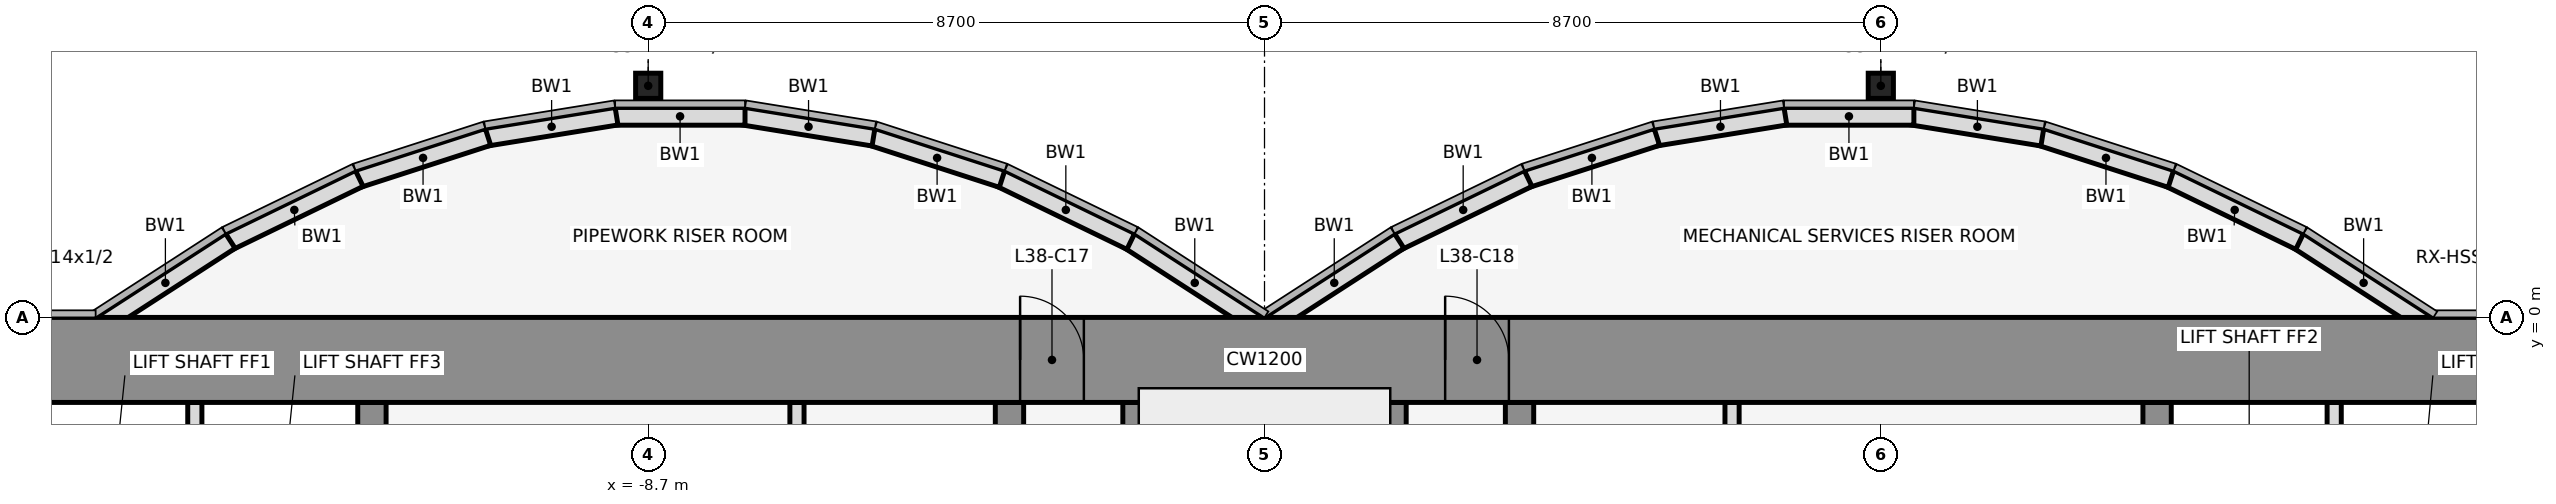
"""IFC4 building model, lengths in metres.
Left out: names, types, materials, properties, quantities, classifications, styles, units other than length and angle.
Written with IfcOpenShell. Run it as: python <this file> out.ifc"""

import sys

from ifc_helpers import new_model, si_unit, direction, frame, frame_2d, origin, origin_2d, place, context, subcontext, project, spatial, rectangle, hollow_rectangle, extrude, element, fill, save


model = new_model("IFC4")
c1 = context("Model", 3, precision=1e-05, world=origin(), true_north=direction((0.0, 1.0)))
c2 = subcontext(c1, "Body", "Model", "MODEL_VIEW")
j1 = project(units=[si_unit("LENGTHUNIT", "METRE"), si_unit("PLANEANGLEUNIT", "RADIAN")], contexts=[c1])
p1 = place(None, origin())
s1 = spatial("IfcSite", under=j1, at=p1, CompositionType="ELEMENT")
p2 = place(p1, origin())
s2 = spatial("IfcBuilding", under=s1, at=p2, CompositionType="ELEMENT")
p3 = place(p2, frame((0.0, 0.0, 173.2)))
s3 = spatial("IfcBuildingStorey", under=s2, at=p3, CompositionType="ELEMENT", Elevation=173.2)
for number, where, z_axis, x_axis in (
    (1, (-8.7, 3.269, 0.0), (0.0, 0.0, 1.0), (1.0, 0.0, 0.0)),
    (2, (8.7, 3.269, 0.0), (0.0, 0.0, 1.0), (1.0, 0.0, 0.0)),
):
    element("IfcColumn", number, at=place(p3, frame(where, z_axis=z_axis, x_axis=x_axis)), inside=s3, PredefinedType="COLUMN", context=c2, shape_type="SweptSolid", body=[
        extrude(hollow_rectangle(XDim=0.356, YDim=0.356, WallThickness=0.012, at=origin_2d()), origin(), (0.0, 0.0, 1.0), 4.1),
    ])
p4 = place(p3, frame((16.432, -0.105, 0.0), z_axis=(0.0, 0.0, 1.0), x_axis=(-0.83981312244, 0.542875602121, 0.0)))
e3 = element("IfcWall", 3, at=p4, inside=s3, PredefinedType="STANDARD", context=c2, shape_type="SweptSolid", body=[
    extrude(rectangle(XDim=2.183, YDim=0.25, at=frame_2d((1.091, 0.0))), origin(), (0.0, 0.0, 1.0), 3.95),
])
p5 = place(p3, frame((14.612, 1.073, 0.0), z_axis=(0.0, 0.0, 1.0), x_axis=(-0.89982408427, 0.436252928206, 0.0)))
e4 = element("IfcWall", 4, at=p5, inside=s3, PredefinedType="STANDARD", context=c2, shape_type="SweptSolid", body=[
    extrude(rectangle(XDim=2.038, YDim=0.25, at=frame_2d((1.019, 0.0))), origin(), (0.0, 0.0, 1.0), 3.95),
])
p6 = place(p3, frame((12.795, 1.955, 0.0), z_axis=(0.0, 0.0, 1.0), x_axis=(-0.951495806175, 0.307661714928, 0.0)))
e5 = element("IfcWall", 5, at=p6, inside=s3, PredefinedType="STANDARD", context=c2, shape_type="SweptSolid", body=[
    extrude(rectangle(XDim=1.927, YDim=0.25, at=frame_2d((0.963, 0.0))), origin(), (0.0, 0.0, 1.0), 3.95),
])
p7 = place(p3, frame((10.98, 2.543, 0.0), z_axis=(0.0, 0.0, 1.0), x_axis=(-0.987181718931, 0.159600293885, 0.0)))
e6 = element("IfcWall", 6, at=p7, inside=s3, PredefinedType="STANDARD", context=c2, shape_type="SweptSolid", body=[
    extrude(rectangle(XDim=1.857, YDim=0.25, at=frame_2d((0.929, 0.0))), origin(), (0.0, 0.0, 1.0), 3.95),
])
p8 = place(p3, frame((9.167, 2.838, 0.0), z_axis=(0.0, 0.0, 1.0), x_axis=(-1.0, 0.0, 0.0)))
e7 = element("IfcWall", 7, at=p8, inside=s3, PredefinedType="STANDARD", context=c2, shape_type="SweptSolid", body=[
    extrude(rectangle(XDim=1.833, YDim=0.25, at=frame_2d((0.917, 0.0))), origin(), (0.0, 0.0, 1.0), 3.95),
])
p9 = place(p3, frame((7.353, 2.84, 0.0), z_axis=(0.0, 0.0, 1.0), x_axis=(-0.987181718931, -0.159600293885, 0.0)))
e8 = element("IfcWall", 8, at=p9, inside=s3, PredefinedType="STANDARD", context=c2, shape_type="SweptSolid", body=[
    extrude(rectangle(XDim=1.857, YDim=0.25, at=frame_2d((0.929, 0.0))), origin(), (0.0, 0.0, 1.0), 3.95),
])
p10 = place(p3, frame((5.538, 2.548, 0.0), z_axis=(0.0, 0.0, 1.0), x_axis=(-0.951495806175, -0.307661714928, 0.0)))
e9 = element("IfcWall", 9, at=p10, inside=s3, PredefinedType="STANDARD", context=c2, shape_type="SweptSolid", body=[
    extrude(rectangle(XDim=1.927, YDim=0.25, at=frame_2d((0.963, 0.0))), origin(), (0.0, 0.0, 1.0), 3.95),
])
p11 = place(p3, frame((3.721, 1.962, 0.0), z_axis=(0.0, 0.0, 1.0), x_axis=(-0.89982408427, -0.436252928206, 0.0)))
e10 = element("IfcWall", 10, at=p11, inside=s3, PredefinedType="STANDARD", context=c2, shape_type="SweptSolid", body=[
    extrude(rectangle(XDim=2.038, YDim=0.25, at=frame_2d((1.019, 0.0))), origin(), (0.0, 0.0, 1.0), 3.95),
])
for number, where, z_axis, x_axis in (
    (11, (1.901, 1.08, 0.0), (0.0, 0.0, 1.0), (-0.84, -0.543, 0.0)),
    (12, (-0.068, -0.105, 0.0), (0.0, 0.0, 1.0), (-0.84, 0.543, 0.0)),
):
    element("IfcWall", number, at=place(p3, frame(where, z_axis=z_axis, x_axis=x_axis)), inside=s3, PredefinedType="STANDARD", context=c2, shape_type="SweptSolid", body=[
        extrude(rectangle(XDim=2.183, YDim=0.25, at=frame_2d((1.091, 0.0))), origin(), (0.0, 0.0, 1.0), 3.95),
    ])
p12 = place(p3, frame((-1.888, 1.073, 0.0), z_axis=(0.0, 0.0, 1.0), x_axis=(-0.89982408427, 0.436252928206, 0.0)))
e13 = element("IfcWall", 13, at=p12, inside=s3, PredefinedType="STANDARD", context=c2, shape_type="SweptSolid", body=[
    extrude(rectangle(XDim=2.038, YDim=0.25, at=frame_2d((1.019, 0.0))), origin(), (0.0, 0.0, 1.0), 3.95),
])
p13 = place(p3, frame((-3.705, 1.955, 0.0), z_axis=(0.0, 0.0, 1.0), x_axis=(-0.951495806175, 0.307661714928, 0.0)))
e14 = element("IfcWall", 14, at=p13, inside=s3, PredefinedType="STANDARD", context=c2, shape_type="SweptSolid", body=[
    extrude(rectangle(XDim=1.927, YDim=0.25, at=frame_2d((0.963, 0.0))), origin(), (0.0, 0.0, 1.0), 3.95),
])
p14 = place(p3, frame((-5.52, 2.543, 0.0), z_axis=(0.0, 0.0, 1.0), x_axis=(-0.987181718931, 0.159600293885, 0.0)))
e15 = element("IfcWall", 15, at=p14, inside=s3, PredefinedType="STANDARD", context=c2, shape_type="SweptSolid", body=[
    extrude(rectangle(XDim=1.857, YDim=0.25, at=frame_2d((0.929, 0.0))), origin(), (0.0, 0.0, 1.0), 3.95),
])
p15 = place(p3, frame((-7.333, 2.838, 0.0), z_axis=(0.0, 0.0, 1.0), x_axis=(-1.0, 0.0, 0.0)))
e16 = element("IfcWall", 16, at=p15, inside=s3, PredefinedType="STANDARD", context=c2, shape_type="SweptSolid", body=[
    extrude(rectangle(XDim=1.833, YDim=0.25, at=frame_2d((0.917, 0.0))), origin(), (0.0, 0.0, 1.0), 3.95),
])
p16 = place(p3, frame((-9.147, 2.84, 0.0), z_axis=(0.0, 0.0, 1.0), x_axis=(-0.987181718931, -0.159600293885, 0.0)))
e17 = element("IfcWall", 17, at=p16, inside=s3, PredefinedType="STANDARD", context=c2, shape_type="SweptSolid", body=[
    extrude(rectangle(XDim=1.857, YDim=0.25, at=frame_2d((0.929, 0.0))), origin(), (0.0, 0.0, 1.0), 3.95),
])
p17 = place(p3, frame((-10.962, 2.548, 0.0), z_axis=(0.0, 0.0, 1.0), x_axis=(-0.951495806175, -0.307661714928, 0.0)))
e18 = element("IfcWall", 18, at=p17, inside=s3, PredefinedType="STANDARD", context=c2, shape_type="SweptSolid", body=[
    extrude(rectangle(XDim=1.927, YDim=0.25, at=frame_2d((0.963, 0.0))), origin(), (0.0, 0.0, 1.0), 3.95),
])
p18 = place(p3, frame((-12.779, 1.962, 0.0), z_axis=(0.0, 0.0, 1.0), x_axis=(-0.89982408427, -0.436252928206, 0.0)))
e19 = element("IfcWall", 19, at=p18, inside=s3, PredefinedType="STANDARD", context=c2, shape_type="SweptSolid", body=[
    extrude(rectangle(XDim=2.038, YDim=0.25, at=frame_2d((1.019, 0.0))), origin(), (0.0, 0.0, 1.0), 3.95),
])
p19 = place(p3, frame((-14.599, 1.08, 0.0), z_axis=(0.0, 0.0, 1.0), x_axis=(-0.83981312244, -0.542875602121, 0.0)))
e20 = element("IfcWall", 20, at=p19, inside=s3, PredefinedType="STANDARD", context=c2, shape_type="SweptSolid", body=[
    extrude(rectangle(XDim=2.183, YDim=0.25, at=frame_2d((1.091, 0.0))), origin(), (0.0, 0.0, 1.0), 3.95),
])
p20 = place(p3, frame((-15.1, -4.6, 0.0), z_axis=(0.0, 0.0, 1.0), x_axis=(0.0, 1.0, 0.0)))
e21 = element("IfcWall", 21, at=p20, inside=s3, PredefinedType="PARTITIONING", context=c2, shape_type="SweptSolid", body=[
    extrude(rectangle(XDim=3.4, YDim=0.2, at=frame_2d((1.7, 0.0))), origin(), (0.0, 0.0, 1.0), 2.84),
])
p21 = place(p3, frame((-12.6, -11.8, 0.0), z_axis=(0.0, 0.0, 1.0), x_axis=(0.0, 1.0, 0.0)))
e22 = element("IfcWall", 22, at=p21, inside=s3, PredefinedType="SHEAR", context=c2, shape_type="SweptSolid", body=[
    extrude(rectangle(XDim=10.6, YDim=0.4, at=frame_2d((5.3, 0.0))), origin(), (0.0, 0.0, 1.0), 4.1),
])
p22 = place(p21, frame((4.75, 0.0, 0.0)))
e23 = element("IfcOpeningElement", 23, at=p22, cuts=e22, PredefinedType="OPENING", context=c2, shape_type="SweptSolid", body=[
    extrude(rectangle(XDim=1.1, YDim=2.1, at=frame_2d((0.55, 1.05))), frame((0.0, 0.212, 0.0), z_axis=(0.0, -1.0, 0.0), x_axis=(1.0, 0.0, 0.0)), (0.0, 0.0, 1.0), 0.424),
])
p23 = place(p3, frame((-6.6, -4.6, 0.0), z_axis=(0.0, 0.0, 1.0), x_axis=(0.0, 1.0, 0.0)))
e24 = element("IfcWall", 24, at=p23, inside=s3, PredefinedType="PARTITIONING", context=c2, shape_type="SweptSolid", body=[
    extrude(rectangle(XDim=3.4, YDim=0.2, at=frame_2d((1.7, 0.0))), origin(), (0.0, 0.0, 1.0), 2.84),
])
p24 = place(p3, frame((-3.6, -11.8, 0.0), z_axis=(0.0, 0.0, 1.0), x_axis=(0.0, 1.0, 0.0)))
e25 = element("IfcWall", 25, at=p24, inside=s3, PredefinedType="SHEAR", context=c2, shape_type="SweptSolid", body=[
    extrude(rectangle(XDim=10.6, YDim=0.4, at=frame_2d((5.3, 0.0))), origin(), (0.0, 0.0, 1.0), 4.1),
])
p25 = place(p24, frame((4.85, 0.0, 0.0)))
e26 = element("IfcOpeningElement", 26, at=p25, cuts=e25, PredefinedType="OPENING", context=c2, shape_type="SweptSolid", body=[
    extrude(rectangle(XDim=0.9, YDim=2.1, at=frame_2d((0.45, 1.05))), frame((0.0, 0.212, 0.0), z_axis=(0.0, -1.0, 0.0), x_axis=(1.0, 0.0, 0.0)), (0.0, 0.0, 1.0), 0.424),
])
for number, where, z_axis, x_axis in (
    (27, (-1.8, -11.8, 0.0), (0.0, 0.0, 1.0), (0.0, 1.0, 0.0)),
    (28, (1.8, -11.8, 0.0), (0.0, 0.0, 1.0), (0.0, 1.0, 0.0)),
):
    element("IfcWall", number, at=place(p3, frame(where, z_axis=z_axis, x_axis=x_axis)), inside=s3, PredefinedType="SHEAR", context=c2, shape_type="SweptSolid", body=[
        extrude(rectangle(XDim=10.6, YDim=0.4, at=frame_2d((5.3, 0.0))), origin(), (0.0, 0.0, 1.0), 4.1),
    ])
p26 = place(p3, frame((3.6, -11.8, 0.0), z_axis=(0.0, 0.0, 1.0), x_axis=(0.0, 1.0, 0.0)))
e29 = element("IfcWall", 29, at=p26, inside=s3, PredefinedType="SHEAR", context=c2, shape_type="SweptSolid", body=[
    extrude(rectangle(XDim=10.6, YDim=0.4, at=frame_2d((5.3, 0.0))), origin(), (0.0, 0.0, 1.0), 4.1),
])
p27 = place(p26, frame((1.35, 0.0, 0.0)))
e30 = element("IfcOpeningElement", 30, at=p27, cuts=e29, PredefinedType="OPENING", context=c2, shape_type="SweptSolid", body=[
    extrude(rectangle(XDim=0.9, YDim=2.1, at=frame_2d((0.45, 1.05))), frame((0.0, 0.212, 0.0), z_axis=(0.0, -1.0, 0.0), x_axis=(1.0, 0.0, 0.0)), (0.0, 0.0, 1.0), 0.424),
])
p28 = place(p3, frame((6.6, -4.6, 0.0), z_axis=(0.0, 0.0, 1.0), x_axis=(0.0, 1.0, 0.0)))
e31 = element("IfcWall", 31, at=p28, inside=s3, PredefinedType="PARTITIONING", context=c2, shape_type="SweptSolid", body=[
    extrude(rectangle(XDim=3.4, YDim=0.2, at=frame_2d((1.7, 0.0))), origin(), (0.0, 0.0, 1.0), 2.84),
])
p29 = place(p3, frame((12.6, -11.8, 0.0), z_axis=(0.0, 0.0, 1.0), x_axis=(0.0, 1.0, 0.0)))
e32 = element("IfcWall", 32, at=p29, inside=s3, PredefinedType="SHEAR", context=c2, shape_type="SweptSolid", body=[
    extrude(rectangle(XDim=10.6, YDim=0.4, at=frame_2d((5.3, 0.0))), origin(), (0.0, 0.0, 1.0), 4.1),
])
p30 = place(p29, frame((1.25, 0.0, 0.0)))
e33 = element("IfcOpeningElement", 33, at=p30, cuts=e32, PredefinedType="OPENING", context=c2, shape_type="SweptSolid", body=[
    extrude(rectangle(XDim=1.2, YDim=2.1, at=frame_2d((0.6, 1.05))), frame((0.0, 0.212, 0.0), z_axis=(0.0, -1.0, 0.0), x_axis=(1.0, 0.0, 0.0)), (0.0, 0.0, 1.0), 0.424),
])
p31 = place(p29, frame((4.75, 0.0, 0.0)))
e34 = element("IfcOpeningElement", 34, at=p31, cuts=e32, PredefinedType="OPENING", context=c2, shape_type="SweptSolid", body=[
    extrude(rectangle(XDim=1.1, YDim=2.1, at=frame_2d((0.55, 1.05))), frame((0.0, 0.212, 0.0), z_axis=(0.0, -1.0, 0.0), x_axis=(1.0, 0.0, 0.0)), (0.0, 0.0, 1.0), 0.424),
])
p32 = place(p3, frame((15.1, -4.6, 0.0), z_axis=(0.0, 0.0, 1.0), x_axis=(0.0, 1.0, 0.0)))
e35 = element("IfcWall", 35, at=p32, inside=s3, PredefinedType="PARTITIONING", context=c2, shape_type="SweptSolid", body=[
    extrude(rectangle(XDim=3.4, YDim=0.2, at=frame_2d((1.7, 0.0))), origin(), (0.0, 0.0, 1.0), 2.84),
])
p33 = place(p3, frame((-22.0, -0.6, 0.0), z_axis=(0.0, 0.0, 1.0), x_axis=(1.0, 0.0, 0.0)))
e36 = element("IfcWall", 36, at=p33, inside=s3, PredefinedType="SHEAR", context=c2, shape_type="SweptSolid", body=[
    extrude(rectangle(XDim=44.0, YDim=1.2, at=frame_2d((22.0, 0.0))), origin(), (0.0, 0.0, 1.0), 4.1),
])
p34 = place(p33, frame((18.55, 0.0, 0.0)))
e37 = element("IfcOpeningElement", 37, at=p34, cuts=e36, PredefinedType="OPENING", context=c2, shape_type="SweptSolid", body=[
    extrude(rectangle(XDim=0.9, YDim=2.1, at=frame_2d((0.45, 1.05))), frame((0.0, 0.612, 0.0), z_axis=(0.0, -1.0, 0.0), x_axis=(1.0, 0.0, 0.0)), (0.0, 0.0, 1.0), 1.224),
])
p35 = place(p33, frame((24.55, 0.0, 0.0)))
e38 = element("IfcOpeningElement", 38, at=p35, cuts=e36, PredefinedType="OPENING", context=c2, shape_type="SweptSolid", body=[
    extrude(rectangle(XDim=0.9, YDim=2.1, at=frame_2d((0.45, 1.05))), frame((0.0, 0.612, 0.0), z_axis=(0.0, -1.0, 0.0), x_axis=(1.0, 0.0, 0.0)), (0.0, 0.0, 1.0), 1.224),
])
p36 = place(p34, origin())
e39 = element("IfcDoor", 39, at=p36, inside=s3, OperationType="SINGLE_SWING_LEFT", PredefinedType="DOOR", context=c2, shape_type="SweptSolid", body=[
    extrude(rectangle(XDim=0.9, YDim=2.1, at=frame_2d((0.45, 1.05))), frame((0.0, 0.025, 0.0), z_axis=(0.0, -1.0, 0.0), x_axis=(1.0, 0.0, 0.0)), (0.0, 0.0, 1.0), 0.05),
])
fill(e37, e39)
p37 = place(p35, origin())
e40 = element("IfcDoor", 40, at=p37, inside=s3, OperationType="SINGLE_SWING_LEFT", PredefinedType="DOOR", context=c2, shape_type="SweptSolid", body=[
    extrude(rectangle(XDim=0.9, YDim=2.1, at=frame_2d((0.45, 1.05))), frame((0.0, 0.025, 0.0), z_axis=(0.0, -1.0, 0.0), x_axis=(1.0, 0.0, 0.0)), (0.0, 0.0, 1.0), 0.05),
])
fill(e38, e40)
save(model, sys.argv[1])
